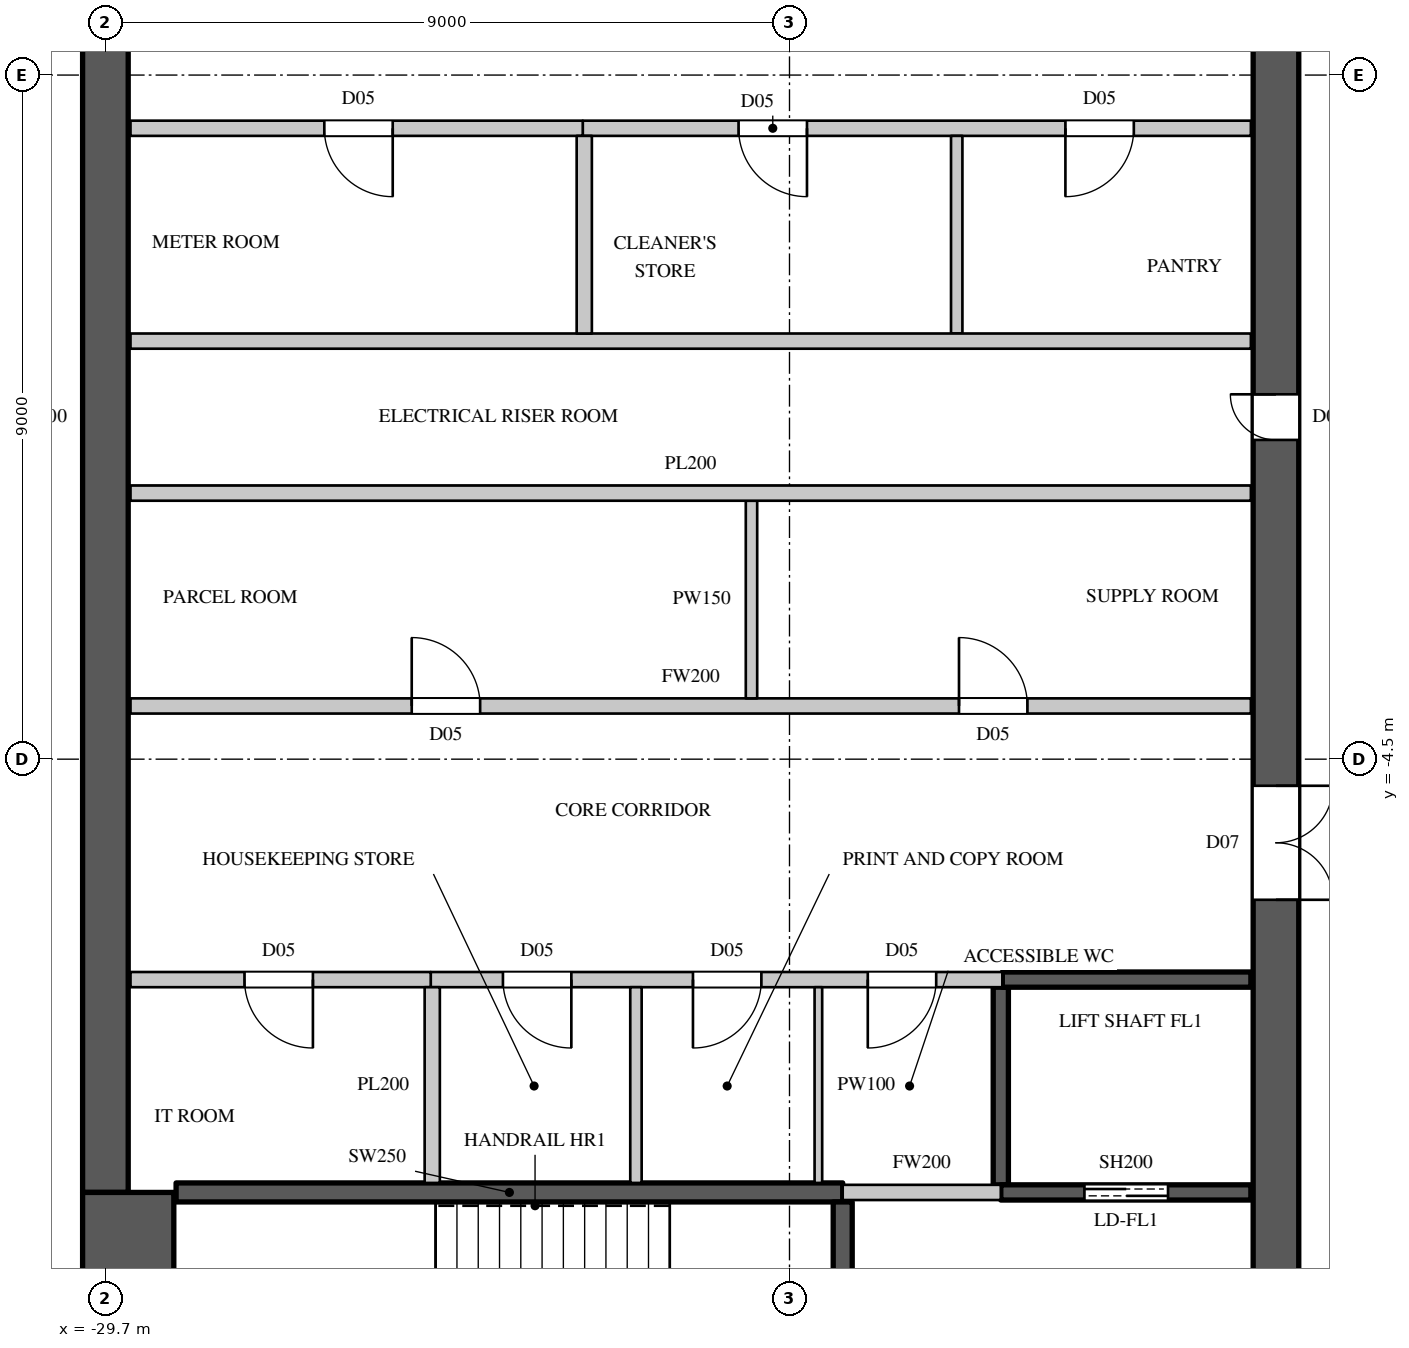
"""IFC4 building model, lengths in metres.
Left out: names, types, materials, properties, quantities, classifications, styles, units other than length and angle.
Written with IfcOpenShell. Run it as: python <this file> out.ifc"""

import sys

from ifc_helpers import new_model, si_unit, direction, frame, frame_2d, origin, place, context, subcontext, project, spatial, rectangle, extrude, element, fill, save


model = new_model("IFC4")
c1 = context("Model", 3, precision=1e-05, world=origin(), true_north=direction((0.0, 1.0)))
c2 = subcontext(c1, "Body", "Model", "MODEL_VIEW")
j1 = project(units=[si_unit("LENGTHUNIT", "METRE"), si_unit("PLANEANGLEUNIT", "RADIAN")], contexts=[c1])
p1 = place(None, origin())
s1 = spatial("IfcSite", under=j1, at=p1, CompositionType="ELEMENT")
p2 = place(p1, origin())
s2 = spatial("IfcBuilding", under=s1, at=p2, CompositionType="ELEMENT")
p3 = place(p2, frame((0.0, 0.0, 351.0)))
s3 = spatial("IfcBuildingStorey", under=s2, at=p3, CompositionType="ELEMENT", Elevation=351.0)
p4 = place(p3, frame((-14.3, -14.8, 0.0), z_axis=(0.0, 0.0, 1.0), x_axis=(0.0, 1.0, 0.0)))
e1 = element("IfcWall", 1, at=p4, inside=s3, PredefinedType="SHEAR", context=c2, shape_type="SweptSolid", body=[
    extrude(rectangle(XDim=29.6, YDim=0.6, at=frame_2d((14.8, 0.0))), origin(), (0.0, 0.0, 1.0), 4.0),
])
p5 = place(p4, frame((1.55, 0.0, 0.0)))
e2 = element("IfcOpeningElement", 2, at=p5, cuts=e1, PredefinedType="OPENING", context=c2, shape_type="SweptSolid", body=[
    extrude(rectangle(XDim=1.5, YDim=2.4, at=frame_2d((0.75, 1.2))), frame((0.0, 0.31, 0.0), z_axis=(0.0, -1.0, 0.0), x_axis=(1.0, 0.0, 0.0)), (0.0, 0.0, 1.0), 0.62),
])
p6 = place(p4, frame((26.55, 0.0, 0.0)))
e3 = element("IfcOpeningElement", 3, at=p6, cuts=e1, PredefinedType="OPENING", context=c2, shape_type="SweptSolid", body=[
    extrude(rectangle(XDim=1.5, YDim=2.4, at=frame_2d((0.75, 1.2))), frame((0.0, 0.31, 0.0), z_axis=(0.0, -1.0, 0.0), x_axis=(1.0, 0.0, 0.0)), (0.0, 0.0, 1.0), 0.62),
])
p7 = place(p4, frame((8.45, 0.0, 0.0)))
e4 = element("IfcOpeningElement", 4, at=p7, cuts=e1, PredefinedType="OPENING", context=c2, shape_type="SweptSolid", body=[
    extrude(rectangle(XDim=1.5, YDim=2.4, at=frame_2d((0.75, 1.2))), frame((0.0, 0.31, 0.0), z_axis=(0.0, -1.0, 0.0), x_axis=(1.0, 0.0, 0.0)), (0.0, 0.0, 1.0), 0.62),
])
p8 = place(p4, frame((19.65, 0.0, 0.0)))
e5 = element("IfcOpeningElement", 5, at=p8, cuts=e1, PredefinedType="OPENING", context=c2, shape_type="SweptSolid", body=[
    extrude(rectangle(XDim=1.5, YDim=2.4, at=frame_2d((0.75, 1.2))), frame((0.0, 0.31, 0.0), z_axis=(0.0, -1.0, 0.0), x_axis=(1.0, 0.0, 0.0)), (0.0, 0.0, 1.0), 0.62),
])
p9 = place(p4, frame((14.5, 0.0, 0.0)))
e6 = element("IfcOpeningElement", 6, at=p9, cuts=e1, PredefinedType="OPENING", context=c2, shape_type="SweptSolid", body=[
    extrude(rectangle(XDim=0.6, YDim=2.0, at=frame_2d((0.3, 1.0))), frame((0.0, 0.31, 0.0), z_axis=(0.0, -1.0, 0.0), x_axis=(1.0, 0.0, 0.0)), (0.0, 0.0, 1.0), 0.62),
])
p10 = place(p3, frame((-29.7, -10.2, 0.0), z_axis=(0.0, 0.0, 1.0), x_axis=(0.0, 1.0, 0.0)))
e7 = element("IfcWall", 7, at=p10, inside=s3, PredefinedType="SHEAR", context=c2, shape_type="SweptSolid", body=[
    extrude(rectangle(XDim=20.4, YDim=0.6, at=frame_2d((10.2, 0.0))), origin(), (0.0, 0.0, 1.0), 4.0),
])
p11 = place(p3, frame((-29.4, -14.8, 0.0), z_axis=(0.0, 0.0, 1.0), x_axis=(0.0, 1.0, 0.0)))
e8 = element("IfcWall", 8, at=p11, inside=s3, PredefinedType="SHEAR", context=c2, shape_type="SweptSolid", body=[
    extrude(rectangle(XDim=4.6, YDim=1.2, at=frame_2d((2.3, 0.0))), origin(), (0.0, 0.0, 1.0), 4.0),
])
p12 = place(p3, frame((-29.37, -3.8, 0.0), z_axis=(0.0, 0.0, 1.0), x_axis=(1.0, 0.0, 0.0)))
e9 = element("IfcWall", 9, at=p12, inside=s3, PredefinedType="PARTITIONING", context=c2, shape_type="SweptSolid", body=[
    extrude(rectangle(XDim=14.74, YDim=0.2, at=frame_2d((7.37, 0.0))), origin(), (0.0, 0.0, 1.0), 3.598),
])
p13 = place(p12, frame((3.7, 0.0, 0.0)))
e10 = element("IfcOpeningElement", 10, at=p13, cuts=e9, PredefinedType="OPENING", context=c2, shape_type="SweptSolid", body=[
    extrude(rectangle(XDim=0.9, YDim=2.2, at=frame_2d((0.45, 1.1))), frame((0.0, 0.11, 0.0), z_axis=(0.0, -1.0, 0.0), x_axis=(1.0, 0.0, 0.0)), (0.0, 0.0, 1.0), 0.22),
])
p14 = place(p12, frame((10.9, 0.0, 0.0)))
e11 = element("IfcOpeningElement", 11, at=p14, cuts=e9, PredefinedType="OPENING", context=c2, shape_type="SweptSolid", body=[
    extrude(rectangle(XDim=0.9, YDim=2.2, at=frame_2d((0.45, 1.1))), frame((0.0, 0.11, 0.0), z_axis=(0.0, -1.0, 0.0), x_axis=(1.0, 0.0, 0.0)), (0.0, 0.0, 1.0), 0.22),
])
p15 = place(p3, frame((-25.42, -7.4, 0.0), z_axis=(0.0, 0.0, 1.0), x_axis=(1.0, 0.0, 0.0)))
e12 = element("IfcWall", 12, at=p15, inside=s3, PredefinedType="PARTITIONING", context=c2, shape_type="SweptSolid", body=[
    extrude(rectangle(XDim=7.52, YDim=0.2, at=frame_2d((3.76, 0.0))), origin(), (0.0, 0.0, 1.0), 3.598),
])
p16 = place(p15, frame((0.95, 0.0, 0.0)))
e13 = element("IfcOpeningElement", 13, at=p16, cuts=e12, PredefinedType="OPENING", context=c2, shape_type="SweptSolid", body=[
    extrude(rectangle(XDim=0.9, YDim=2.2, at=frame_2d((0.45, 1.1))), frame((0.0, 0.11, 0.0), z_axis=(0.0, -1.0, 0.0), x_axis=(1.0, 0.0, 0.0)), (0.0, 0.0, 1.0), 0.22),
])
p17 = place(p15, frame((3.45, 0.0, 0.0)))
e14 = element("IfcOpeningElement", 14, at=p17, cuts=e12, PredefinedType="OPENING", context=c2, shape_type="SweptSolid", body=[
    extrude(rectangle(XDim=0.9, YDim=2.2, at=frame_2d((0.45, 1.1))), frame((0.0, 0.11, 0.0), z_axis=(0.0, -1.0, 0.0), x_axis=(1.0, 0.0, 0.0)), (0.0, 0.0, 1.0), 0.22),
])
p18 = place(p15, frame((5.75, 0.0, 0.0)))
e15 = element("IfcOpeningElement", 15, at=p18, cuts=e12, PredefinedType="OPENING", context=c2, shape_type="SweptSolid", body=[
    extrude(rectangle(XDim=0.9, YDim=2.2, at=frame_2d((0.45, 1.1))), frame((0.0, 0.11, 0.0), z_axis=(0.0, -1.0, 0.0), x_axis=(1.0, 0.0, 0.0)), (0.0, 0.0, 1.0), 0.22),
])
p19 = place(p3, frame((-23.42, 3.8, 0.0), z_axis=(0.0, 0.0, 1.0), x_axis=(1.0, 0.0, 0.0)))
e16 = element("IfcWall", 16, at=p19, inside=s3, PredefinedType="PARTITIONING", context=c2, shape_type="SweptSolid", body=[
    extrude(rectangle(XDim=8.79, YDim=0.2, at=frame_2d((4.395, 0.0))), origin(), (0.0, 0.0, 1.0), 3.598),
])
p20 = place(p19, frame((2.05, 0.0, 0.0)))
e17 = element("IfcOpeningElement", 17, at=p20, cuts=e16, PredefinedType="OPENING", context=c2, shape_type="SweptSolid", body=[
    extrude(rectangle(XDim=0.9, YDim=2.2, at=frame_2d((0.45, 1.1))), frame((0.0, 0.11, 0.0), z_axis=(0.0, -1.0, 0.0), x_axis=(1.0, 0.0, 0.0)), (0.0, 0.0, 1.0), 0.22),
])
p21 = place(p19, frame((6.35, 0.0, 0.0)))
e18 = element("IfcOpeningElement", 18, at=p21, cuts=e16, PredefinedType="OPENING", context=c2, shape_type="SweptSolid", body=[
    extrude(rectangle(XDim=0.9, YDim=2.2, at=frame_2d((0.45, 1.1))), frame((0.0, 0.11, 0.0), z_axis=(0.0, -1.0, 0.0), x_axis=(1.0, 0.0, 0.0)), (0.0, 0.0, 1.0), 0.22),
])
p22 = place(p3, frame((-20.0, -10.2, 0.0), z_axis=(0.0, 0.0, 1.0), x_axis=(1.0, 0.0, 0.0)))
e19 = element("IfcWall", 19, at=p22, inside=s3, PredefinedType="PARTITIONING", context=c2, shape_type="SweptSolid", body=[
    extrude(rectangle(XDim=2.08, YDim=0.2, at=frame_2d((1.04, 0.0))), origin(), (0.0, 0.0, 1.0), 3.598),
])
p23 = place(p3, frame((-22.72, -10.075, 0.0), z_axis=(0.0, 0.0, 1.0), x_axis=(0.0, 1.0, 0.0)))
e20 = element("IfcWall", 20, at=p23, inside=s3, PredefinedType="PARTITIONING", context=c2, shape_type="SweptSolid", body=[
    extrude(rectangle(XDim=2.575, YDim=0.15, at=frame_2d((1.288, 0.0))), origin(), (0.0, 0.0, 1.0), 3.598),
])
for number, where, z_axis, x_axis in (
    (21, (-21.2, -3.7, 0.0), (0.0, 0.0, 1.0), (0.0, 1.0, 0.0)),
    (22, (-18.5, 1.1, 0.0), (0.0, 0.0, 1.0), (0.0, 1.0, 0.0)),
):
    element("IfcWall", number, at=place(p3, frame(where, z_axis=z_axis, x_axis=x_axis)), inside=s3, PredefinedType="PARTITIONING", context=c2, shape_type="SweptSolid", body=[
        extrude(rectangle(XDim=2.6, YDim=0.15, at=frame_2d((1.3, 0.0))), origin(), (0.0, 0.0, 1.0), 3.598),
    ])
p24 = place(p3, frame((-29.37, -7.4, 0.0), z_axis=(0.0, 0.0, 1.0), x_axis=(1.0, 0.0, 0.0)))
e23 = element("IfcWall", 23, at=p24, inside=s3, PredefinedType="PARTITIONING", context=c2, shape_type="SweptSolid", body=[
    extrude(rectangle(XDim=3.95, YDim=0.2, at=frame_2d((1.975, 0.0))), origin(), (0.0, 0.0, 1.0), 3.598),
])
p25 = place(p24, frame((1.5, 0.0, 0.0)))
e24 = element("IfcOpeningElement", 24, at=p25, cuts=e23, PredefinedType="OPENING", context=c2, shape_type="SweptSolid", body=[
    extrude(rectangle(XDim=0.9, YDim=2.2, at=frame_2d((0.45, 1.1))), frame((0.0, 0.11, 0.0), z_axis=(0.0, -1.0, 0.0), x_axis=(1.0, 0.0, 0.0)), (0.0, 0.0, 1.0), 0.22),
])
for number, where, z_axis, x_axis in (
    (25, (-29.37, -1.0, 0.0), (0.0, 0.0, 1.0), (1.0, 0.0, 0.0)),
    (26, (-29.37, 1.0, 0.0), (0.0, 0.0, 1.0), (1.0, 0.0, 0.0)),
):
    element("IfcWall", number, at=place(p3, frame(where, z_axis=z_axis, x_axis=x_axis)), inside=s3, PredefinedType="PARTITIONING", context=c2, shape_type="SweptSolid", body=[
        extrude(rectangle(XDim=14.74, YDim=0.2, at=frame_2d((7.37, 0.0))), origin(), (0.0, 0.0, 1.0), 3.598),
    ])
p26 = place(p3, frame((-29.37, 3.8, 0.0), z_axis=(0.0, 0.0, 1.0), x_axis=(1.0, 0.0, 0.0)))
e27 = element("IfcWall", 27, at=p26, inside=s3, PredefinedType="PARTITIONING", context=c2, shape_type="SweptSolid", body=[
    extrude(rectangle(XDim=5.95, YDim=0.2, at=frame_2d((2.975, 0.0))), origin(), (0.0, 0.0, 1.0), 3.598),
])
p27 = place(p26, frame((2.55, 0.0, 0.0)))
e28 = element("IfcOpeningElement", 28, at=p27, cuts=e27, PredefinedType="OPENING", context=c2, shape_type="SweptSolid", body=[
    extrude(rectangle(XDim=0.9, YDim=2.2, at=frame_2d((0.45, 1.1))), frame((0.0, 0.11, 0.0), z_axis=(0.0, -1.0, 0.0), x_axis=(1.0, 0.0, 0.0)), (0.0, 0.0, 1.0), 0.22),
])
p28 = place(p3, frame((-25.4, -10.075, 0.0), z_axis=(0.0, 0.0, 1.0), x_axis=(0.0, 1.0, 0.0)))
e29 = element("IfcWall", 29, at=p28, inside=s3, PredefinedType="PARTITIONING", context=c2, shape_type="SweptSolid", body=[
    extrude(rectangle(XDim=2.575, YDim=0.2, at=frame_2d((1.288, 0.0))), origin(), (0.0, 0.0, 1.0), 3.598),
])
p29 = place(p3, frame((-23.4, 1.1, 0.0), z_axis=(0.0, 0.0, 1.0), x_axis=(0.0, 1.0, 0.0)))
e30 = element("IfcWall", 30, at=p29, inside=s3, PredefinedType="PARTITIONING", context=c2, shape_type="SweptSolid", body=[
    extrude(rectangle(XDim=2.6, YDim=0.2, at=frame_2d((1.3, 0.0))), origin(), (0.0, 0.0, 1.0), 3.598),
])
p30 = place(p3, frame((-17.92, -10.1, 0.0), z_axis=(0.0, 0.0, 1.0), x_axis=(0.0, 1.0, 0.0)))
e31 = element("IfcWall", 31, at=p30, inside=s3, PredefinedType="SHEAR", context=c2, shape_type="SweptSolid", body=[
    extrude(rectangle(XDim=2.6, YDim=0.2, at=frame_2d((1.3, 0.0))), origin(), (0.0, 0.0, 1.0), 3.598),
])
p31 = place(p3, frame((-17.92, -10.2, 0.0), z_axis=(0.0, 0.0, 1.0), x_axis=(1.0, 0.0, 0.0)))
e32 = element("IfcWall", 32, at=p31, inside=s3, PredefinedType="SHEAR", context=c2, shape_type="SweptSolid", body=[
    extrude(rectangle(XDim=3.29, YDim=0.2, at=frame_2d((1.645, 0.0))), origin(), (0.0, 0.0, 1.0), 3.598),
])
p32 = place(p31, frame((1.1, 0.0, 0.0)))
e33 = element("IfcOpeningElement", 33, at=p32, cuts=e32, PredefinedType="OPENING", context=c2, shape_type="SweptSolid", body=[
    extrude(rectangle(XDim=1.1, YDim=2.2, at=frame_2d((0.55, 1.1))), frame((0.0, 0.11, 0.0), z_axis=(0.0, -1.0, 0.0), x_axis=(1.0, 0.0, 0.0)), (0.0, 0.0, 1.0), 0.22),
])
p33 = place(p3, frame((-17.9, -7.4, 0.0), z_axis=(0.0, 0.0, 1.0), x_axis=(1.0, 0.0, 0.0)))
e34 = element("IfcWall", 34, at=p33, inside=s3, PredefinedType="SHEAR", context=c2, shape_type="SweptSolid", body=[
    extrude(rectangle(XDim=3.27, YDim=0.2, at=frame_2d((1.635, 0.0))), origin(), (0.0, 0.0, 1.0), 3.598),
])
p34 = place(p3, frame((-28.77, -10.2, 0.0), z_axis=(0.0, 0.0, 1.0), x_axis=(1.0, 0.0, 0.0)))
e35 = element("IfcWall", 35, at=p34, inside=s3, PredefinedType="SHEAR", context=c2, shape_type="SweptSolid", body=[
    extrude(rectangle(XDim=8.77, YDim=0.25, at=frame_2d((4.385, 0.0))), origin(), (0.0, 0.0, 1.0), 3.598),
])
p35 = place(p3, frame((-20.0, -14.77, 0.0), z_axis=(0.0, 0.0, 1.0), x_axis=(0.0, 1.0, 0.0)))
e36 = element("IfcWall", 36, at=p35, inside=s3, PredefinedType="SHEAR", context=c2, shape_type="SweptSolid", body=[
    extrude(rectangle(XDim=4.445, YDim=0.25, at=frame_2d((2.223, 0.0))), origin(), (0.0, 0.0, 1.0), 3.598),
])
p36 = place(p35, frame((1.7, 0.0, 0.0)))
e37 = element("IfcOpeningElement", 37, at=p36, cuts=e36, PredefinedType="OPENING", context=c2, shape_type="SweptSolid", body=[
    extrude(rectangle(XDim=1.1, YDim=2.2, at=frame_2d((0.55, 1.1))), frame((0.0, 0.135, 0.0), z_axis=(0.0, -1.0, 0.0), x_axis=(1.0, 0.0, 0.0)), (0.0, 0.0, 1.0), 0.27),
])
p37 = place(p3, frame((-20.32, -10.075, 0.0), z_axis=(0.0, 0.0, 1.0), x_axis=(0.0, 1.0, 0.0)))
e38 = element("IfcWall", 38, at=p37, inside=s3, PredefinedType="PARTITIONING", context=c2, shape_type="SweptSolid", body=[
    extrude(rectangle(XDim=2.575, YDim=0.1, at=frame_2d((1.288, 0.0))), origin(), (0.0, 0.0, 1.0), 3.598),
])
p38 = place(p25, origin())
e39 = element("IfcDoor", 39, at=p38, inside=s3, OperationType="SINGLE_SWING_LEFT", PredefinedType="DOOR", context=c2, shape_type="SweptSolid", body=[
    extrude(rectangle(XDim=0.9, YDim=2.2, at=frame_2d((0.45, 1.1))), frame((0.0, 0.025, 0.0), z_axis=(0.0, -1.0, 0.0), x_axis=(1.0, 0.0, 0.0)), (0.0, 0.0, 1.0), 0.05),
])
fill(e24, e39)
p39 = place(p16, origin())
e40 = element("IfcDoor", 40, at=p39, inside=s3, OperationType="SINGLE_SWING_LEFT", PredefinedType="DOOR", context=c2, shape_type="SweptSolid", body=[
    extrude(rectangle(XDim=0.9, YDim=2.2, at=frame_2d((0.45, 1.1))), frame((0.0, 0.025, 0.0), z_axis=(0.0, -1.0, 0.0), x_axis=(1.0, 0.0, 0.0)), (0.0, 0.0, 1.0), 0.05),
])
fill(e13, e40)
p40 = place(p17, origin())
e41 = element("IfcDoor", 41, at=p40, inside=s3, OperationType="SINGLE_SWING_RIGHT", PredefinedType="DOOR", context=c2, shape_type="SweptSolid", body=[
    extrude(rectangle(XDim=0.9, YDim=2.2, at=frame_2d((0.45, 1.1))), frame((0.0, 0.025, 0.0), z_axis=(0.0, -1.0, 0.0), x_axis=(1.0, 0.0, 0.0)), (0.0, 0.0, 1.0), 0.05),
])
fill(e14, e41)
p41 = place(p18, origin())
e42 = element("IfcDoor", 42, at=p41, inside=s3, OperationType="SINGLE_SWING_RIGHT", PredefinedType="DOOR", context=c2, shape_type="SweptSolid", body=[
    extrude(rectangle(XDim=0.9, YDim=2.2, at=frame_2d((0.45, 1.1))), frame((0.0, 0.025, 0.0), z_axis=(0.0, -1.0, 0.0), x_axis=(1.0, 0.0, 0.0)), (0.0, 0.0, 1.0), 0.05),
])
fill(e15, e42)
p42 = place(p13, origin())
e43 = element("IfcDoor", 43, at=p42, inside=s3, OperationType="SINGLE_SWING_LEFT", PredefinedType="DOOR", context=c2, shape_type="SweptSolid", body=[
    extrude(rectangle(XDim=0.9, YDim=2.2, at=frame_2d((0.45, 1.1))), frame((0.0, 0.025, 0.0), z_axis=(0.0, -1.0, 0.0), x_axis=(1.0, 0.0, 0.0)), (0.0, 0.0, 1.0), 0.05),
])
fill(e10, e43)
p43 = place(p14, origin())
e44 = element("IfcDoor", 44, at=p43, inside=s3, OperationType="SINGLE_SWING_LEFT", PredefinedType="DOOR", context=c2, shape_type="SweptSolid", body=[
    extrude(rectangle(XDim=0.9, YDim=2.2, at=frame_2d((0.45, 1.1))), frame((0.0, 0.025, 0.0), z_axis=(0.0, -1.0, 0.0), x_axis=(1.0, 0.0, 0.0)), (0.0, 0.0, 1.0), 0.05),
])
fill(e11, e44)
p44 = place(p27, origin())
e45 = element("IfcDoor", 45, at=p44, inside=s3, OperationType="SINGLE_SWING_LEFT", PredefinedType="DOOR", context=c2, shape_type="SweptSolid", body=[
    extrude(rectangle(XDim=0.9, YDim=2.2, at=frame_2d((0.45, 1.1))), frame((0.0, 0.025, 0.0), z_axis=(0.0, -1.0, 0.0), x_axis=(1.0, 0.0, 0.0)), (0.0, 0.0, 1.0), 0.05),
])
fill(e28, e45)
p45 = place(p20, origin())
e46 = element("IfcDoor", 46, at=p45, inside=s3, OperationType="SINGLE_SWING_LEFT", PredefinedType="DOOR", context=c2, shape_type="SweptSolid", body=[
    extrude(rectangle(XDim=0.9, YDim=2.2, at=frame_2d((0.45, 1.1))), frame((0.0, 0.025, 0.0), z_axis=(0.0, -1.0, 0.0), x_axis=(1.0, 0.0, 0.0)), (0.0, 0.0, 1.0), 0.05),
])
fill(e17, e46)
p46 = place(p21, origin())
e47 = element("IfcDoor", 47, at=p46, inside=s3, OperationType="SINGLE_SWING_RIGHT", PredefinedType="DOOR", context=c2, shape_type="SweptSolid", body=[
    extrude(rectangle(XDim=0.9, YDim=2.2, at=frame_2d((0.45, 1.1))), frame((0.0, 0.025, 0.0), z_axis=(0.0, -1.0, 0.0), x_axis=(1.0, 0.0, 0.0)), (0.0, 0.0, 1.0), 0.05),
])
fill(e18, e47)
p47 = place(p32, origin())
e48 = element("IfcDoor", 48, at=p47, inside=s3, OperationType="DOUBLE_DOOR_SLIDING", PredefinedType="DOOR", context=c2, shape_type="SweptSolid", body=[
    extrude(rectangle(XDim=1.1, YDim=2.2, at=frame_2d((0.55, 1.1))), frame((0.0, 0.025, 0.0), z_axis=(0.0, -1.0, 0.0), x_axis=(1.0, 0.0, 0.0)), (0.0, 0.0, 1.0), 0.05),
])
fill(e33, e48)
p48 = place(p7, origin())
e49 = element("IfcDoor", 49, at=p48, inside=s3, OperationType="DOUBLE_DOOR_SINGLE_SWING", PredefinedType="DOOR", context=c2, shape_type="SweptSolid", body=[
    extrude(rectangle(XDim=1.5, YDim=2.4, at=frame_2d((0.75, 1.2))), frame((0.0, -0.245, 0.0), z_axis=(0.0, -1.0, 0.0), x_axis=(1.0, 0.0, 0.0)), (0.0, 0.0, 1.0), 0.05),
])
fill(e4, e49)
p49 = place(p9, origin())
e50 = element("IfcDoor", 50, at=p49, inside=s3, OperationType="SINGLE_SWING_RIGHT", PredefinedType="DOOR", context=c2, shape_type="SweptSolid", body=[
    extrude(rectangle(XDim=0.6, YDim=2.0, at=frame_2d((0.3, 1.0))), frame((0.0, 0.295, 0.0), z_axis=(0.0, -1.0, 0.0), x_axis=(1.0, 0.0, 0.0)), (0.0, 0.0, 1.0), 0.05),
])
fill(e6, e50)
save(model, sys.argv[1])
